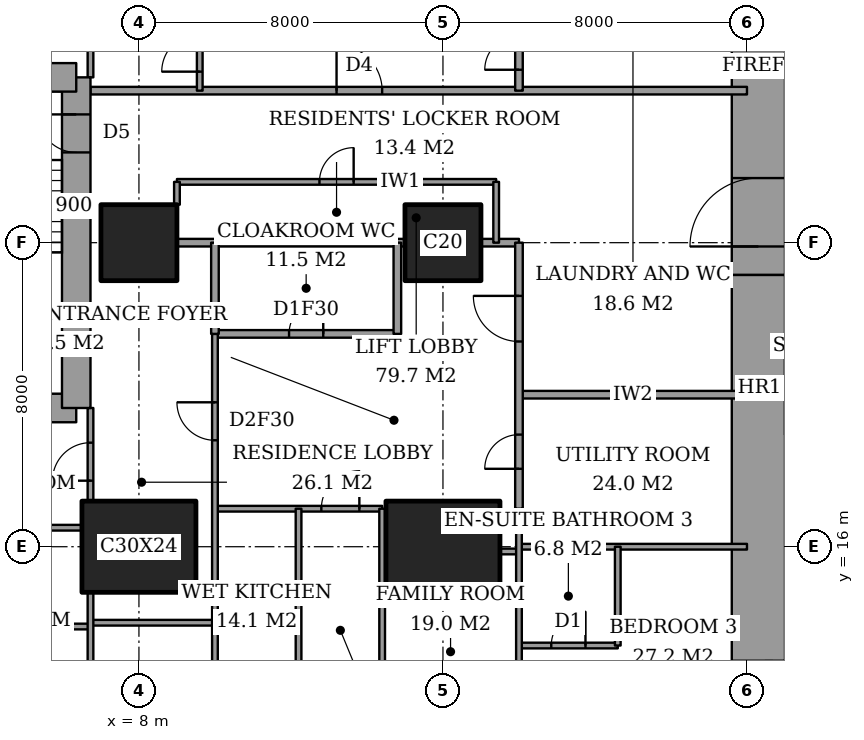
"""IFC4 building model, lengths in metres.
Left out: names, types, materials, properties, quantities, classifications, styles, units other than length and angle.
Written with IfcOpenShell. Run it as: python <this file> out.ifc"""

import sys

from ifc_helpers import new_model, si_unit, direction, frame, frame_2d, origin, origin_2d, place, context, subcontext, project, spatial, rectangle, extrude, element, fill, save


model = new_model("IFC4")
c1 = context("Model", 3, precision=1e-05, world=origin(), true_north=direction((0.0, 1.0)))
c2 = subcontext(c1, "Body", "Model", "MODEL_VIEW")
j1 = project(units=[si_unit("LENGTHUNIT", "METRE"), si_unit("PLANEANGLEUNIT", "RADIAN")], contexts=[c1])
p1 = place(None, origin())
s1 = spatial("IfcSite", under=j1, at=p1, CompositionType="ELEMENT")
p2 = place(p1, origin())
s2 = spatial("IfcBuilding", under=s1, at=p2, CompositionType="ELEMENT")
p3 = place(p2, frame((0.0, 0.0, 44.0)))
s3 = spatial("IfcBuildingStorey", under=s2, at=p3, CompositionType="ELEMENT", Elevation=44.0)
p4 = place(p3, frame((8.0, 16.0, 0.0), z_axis=(0.0, 0.0, 1.0), x_axis=(1.0, 0.0, 0.0)))
e1 = element("IfcColumn", 1, at=p4, inside=s3, PredefinedType="COLUMN", context=c2, shape_type="SweptSolid", body=[
    extrude(rectangle(XDim=3.0, YDim=2.4, at=origin_2d()), origin(), (0.0, 0.0, 1.0), 3.6),
])
p5 = place(p3, frame((8.0, 24.0, 0.0), z_axis=(0.0, 0.0, 1.0), x_axis=(1.0, 0.0, 0.0)))
e2 = element("IfcColumn", 2, at=p5, inside=s3, PredefinedType="COLUMN", context=c2, shape_type="SweptSolid", body=[
    extrude(rectangle(XDim=2.0, YDim=2.0, at=origin_2d()), origin(), (0.0, 0.0, 1.0), 3.6),
])
p6 = place(p3, frame((16.0, 16.0, 0.0), z_axis=(0.0, 0.0, 1.0), x_axis=(1.0, 0.0, 0.0)))
e3 = element("IfcColumn", 3, at=p6, inside=s3, PredefinedType="COLUMN", context=c2, shape_type="SweptSolid", body=[
    extrude(rectangle(XDim=3.0, YDim=2.4, at=origin_2d()), origin(), (0.0, 0.0, 1.0), 3.6),
])
p7 = place(p3, frame((16.0, 24.0, 0.0), z_axis=(0.0, 0.0, 1.0), x_axis=(1.0, 0.0, 0.0)))
e4 = element("IfcColumn", 4, at=p7, inside=s3, PredefinedType="COLUMN", context=c2, shape_type="SweptSolid", body=[
    extrude(rectangle(XDim=2.0, YDim=2.0, at=origin_2d()), origin(), (0.0, 0.0, 1.0), 3.6),
])
p8 = place(p3, frame((24.3, 13.0, 0.0), z_axis=(0.0, 0.0, 1.0), x_axis=(0.0, 1.0, 0.0)))
e5 = element("IfcWall", 5, at=p8, inside=s3, PredefinedType="SHEAR", context=c2, shape_type="SweptSolid", body=[
    extrude(rectangle(XDim=10.15, YDim=1.4, at=frame_2d((5.075, 0.0))), origin(), (0.0, 0.0, 1.0), 3.6),
])
p9 = place(p3, frame((24.3, 23.15, 0.0), z_axis=(0.0, 0.0, 1.0), x_axis=(0.0, 1.0, 0.0)))
e6 = element("IfcWall", 6, at=p9, inside=s3, PredefinedType="SHEAR", context=c2, shape_type="SweptSolid", body=[
    extrude(rectangle(XDim=11.85, YDim=1.4, at=frame_2d((5.925, 0.0))), origin(), (0.0, 0.0, 1.0), 3.6),
])
p10 = place(p9, frame((0.75, 0.0, 0.0)))
e7 = element("IfcOpeningElement", 7, at=p10, cuts=e6, PredefinedType="OPENING", context=c2, shape_type="SweptSolid", body=[
    extrude(rectangle(XDim=1.8, YDim=2.4, at=frame_2d((0.9, 1.2))), frame((0.0, 0.71, 0.0), z_axis=(0.0, -1.0, 0.0), x_axis=(1.0, 0.0, 0.0)), (0.0, 0.0, 1.0), 1.42),
])
p11 = place(p3, frame((1.9, 19.65, 0.0), z_axis=(0.0, 0.0, 1.0), x_axis=(1.0, 0.0, 0.0)))
e8 = element("IfcWall", 8, at=p11, inside=s3, PredefinedType="SHEAR", context=c2, shape_type="SweptSolid", body=[
    extrude(rectangle(XDim=4.45, YDim=0.75, at=frame_2d((2.225, 0.0))), origin(), (0.0, 0.0, 1.0), 3.6),
])
p12 = place(p3, frame((6.35, 19.65, 0.0), z_axis=(0.0, 0.0, 1.0), x_axis=(0.0, 1.0, 0.0)))
e9 = element("IfcWall", 9, at=p12, inside=s3, PredefinedType="SHEAR", context=c2, shape_type="SweptSolid", body=[
    extrude(rectangle(XDim=8.7, YDim=0.75, at=frame_2d((4.35, 0.0))), origin(), (0.0, 0.0, 1.0), 3.6),
])
p13 = place(p12, frame((6.725, 0.0, 0.0)))
e10 = element("IfcOpeningElement", 10, at=p13, cuts=e9, PredefinedType="OPENING", context=c2, shape_type="SweptSolid", body=[
    extrude(rectangle(XDim=1.0, YDim=2.1, at=frame_2d((0.5, 1.05))), frame((0.0, 0.385, 0.0), z_axis=(0.0, -1.0, 0.0), x_axis=(1.0, 0.0, 0.0)), (0.0, 0.0, 1.0), 0.77),
])
p14 = place(p3, frame((6.35, 28.35, 0.0), z_axis=(0.0, 0.0, 1.0), x_axis=(-1.0, 0.0, 0.0)))
e11 = element("IfcWall", 11, at=p14, inside=s3, PredefinedType="SHEAR", context=c2, shape_type="SweptSolid", body=[
    extrude(rectangle(XDim=4.45, YDim=0.75, at=frame_2d((2.225, 0.0))), origin(), (0.0, 0.0, 1.0), 3.6),
])
p15 = place(p3, frame((18.0, 13.4, 0.0), z_axis=(0.0, 0.0, 1.0), x_axis=(1.0, 0.0, 0.0)))
e12 = element("IfcWall", 12, at=p15, inside=s3, PredefinedType="PARTITIONING", context=c2, shape_type="SweptSolid", body=[
    extrude(rectangle(XDim=2.6, YDim=0.15, at=frame_2d((1.3, 0.0))), origin(), (0.0, 0.0, 1.0), 3.35),
])
p16 = place(p15, frame((0.85, 0.0, 0.0)))
e13 = element("IfcOpeningElement", 13, at=p16, cuts=e12, PredefinedType="OPENING", context=c2, shape_type="SweptSolid", body=[
    extrude(rectangle(XDim=0.9, YDim=2.1, at=frame_2d((0.45, 1.05))), frame((0.0, 0.085, 0.0), z_axis=(0.0, -1.0, 0.0), x_axis=(1.0, 0.0, 0.0)), (0.0, 0.0, 1.0), 0.17),
])
p17 = place(p3, frame((4.325, 13.9, 0.0), z_axis=(0.0, 0.0, 1.0), x_axis=(1.0, 0.0, 0.0)))
e14 = element("IfcWall", 14, at=p17, inside=s3, PredefinedType="PARTITIONING", context=c2, shape_type="SweptSolid", body=[
    extrude(rectangle(XDim=2.4, YDim=0.15, at=frame_2d((1.2, 0.0))), origin(), (0.0, 0.0, 1.0), 3.35),
])
p18 = place(p3, frame((6.725, 14.0, 0.0), z_axis=(0.0, 0.0, 1.0), x_axis=(1.0, 0.0, 0.0)))
e15 = element("IfcWall", 15, at=p18, inside=s3, PredefinedType="PARTITIONING", context=c2, shape_type="SweptSolid", body=[
    extrude(rectangle(XDim=3.275, YDim=0.15, at=frame_2d((1.637, 0.0))), origin(), (0.0, 0.0, 1.0), 3.35),
])
p19 = place(p3, frame((17.5, 15.875, 0.0), z_axis=(0.0, 0.0, 1.0), x_axis=(1.0, 0.0, 0.0)))
e16 = element("IfcWall", 16, at=p19, inside=s3, PredefinedType="PARTITIONING", context=c2, shape_type="SweptSolid", body=[
    extrude(rectangle(XDim=0.5, YDim=0.15, at=frame_2d((0.25, 0.0))), origin(), (0.0, 0.0, 1.0), 2.634),
])
p20 = place(p3, frame((18.0, 16.0, 0.0), z_axis=(0.0, 0.0, 1.0), x_axis=(1.0, 0.0, 0.0)))
e17 = element("IfcWall", 17, at=p20, inside=s3, PredefinedType="PARTITIONING", context=c2, shape_type="SweptSolid", body=[
    extrude(rectangle(XDim=6.0, YDim=0.15, at=frame_2d((3.0, 0.0))), origin(), (0.0, 0.0, 1.0), 2.634),
])
p21 = place(p3, frame((1.35, 16.5, 0.0), z_axis=(0.0, 0.0, 1.0), x_axis=(1.0, 0.0, 0.0)))
e18 = element("IfcWall", 18, at=p21, inside=s3, PredefinedType="PARTITIONING", context=c2, shape_type="SweptSolid", body=[
    extrude(rectangle(XDim=5.15, YDim=0.15, at=frame_2d((2.575, 0.0))), origin(), (0.0, 0.0, 1.0), 3.35),
])
p22 = place(p3, frame((10.0, 17.0, 0.0), z_axis=(0.0, 0.0, 1.0), x_axis=(1.0, 0.0, 0.0)))
e19 = element("IfcWall", 19, at=p22, inside=s3, PredefinedType="PARTITIONING", context=c2, shape_type="SweptSolid", body=[
    extrude(rectangle(XDim=4.4, YDim=0.15, at=frame_2d((2.2, 0.0))), origin(), (0.0, 0.0, 1.0), 3.35),
])
p23 = place(p22, frame((2.8, 0.0, 0.0)))
e20 = element("IfcOpeningElement", 20, at=p23, cuts=e19, PredefinedType="OPENING", context=c2, shape_type="SweptSolid", body=[
    extrude(rectangle(XDim=1.0, YDim=2.1, at=frame_2d((0.5, 1.05))), frame((0.0, 0.085, 0.0), z_axis=(0.0, -1.0, 0.0), x_axis=(1.0, 0.0, 0.0)), (0.0, 0.0, 1.0), 0.17),
])
p24 = place(p3, frame((18.0, 20.0, 0.0), z_axis=(0.0, 0.0, 1.0), x_axis=(1.0, 0.0, 0.0)))
e21 = element("IfcWall", 21, at=p24, inside=s3, PredefinedType="PARTITIONING", context=c2, shape_type="SweptSolid", body=[
    extrude(rectangle(XDim=6.0, YDim=0.2, at=frame_2d((3.0, 0.0))), origin(), (0.0, 0.0, 1.0), 3.35),
])
p25 = place(p3, frame((10.0, 21.6, 0.0), z_axis=(0.0, 0.0, 1.0), x_axis=(1.0, 0.0, 0.0)))
e22 = element("IfcWall", 22, at=p25, inside=s3, PredefinedType="PARTITIONING", context=c2, shape_type="SweptSolid", body=[
    extrude(rectangle(XDim=4.8, YDim=0.2, at=frame_2d((2.4, 0.0))), origin(), (0.0, 0.0, 1.0), 3.35),
])
p26 = place(p25, frame((1.95, 0.0, 0.0)))
e23 = element("IfcOpeningElement", 23, at=p26, cuts=e22, PredefinedType="OPENING", context=c2, shape_type="SweptSolid", body=[
    extrude(rectangle(XDim=0.9, YDim=2.1, at=frame_2d((0.45, 1.05))), frame((0.0, 0.11, 0.0), z_axis=(0.0, -1.0, 0.0), x_axis=(1.0, 0.0, 0.0)), (0.0, 0.0, 1.0), 0.22),
])
p27 = place(p3, frame((9.0, 24.0, 0.0), z_axis=(0.0, 0.0, 1.0), x_axis=(1.0, 0.0, 0.0)))
e24 = element("IfcWall", 24, at=p27, inside=s3, PredefinedType="PARTITIONING", context=c2, shape_type="SweptSolid", body=[
    extrude(rectangle(XDim=6.0, YDim=0.2, at=frame_2d((3.0, 0.0))), origin(), (0.0, 0.0, 1.0), 3.35),
])
p28 = place(p3, frame((17.0, 24.0, 0.0), z_axis=(0.0, 0.0, 1.0), x_axis=(1.0, 0.0, 0.0)))
e25 = element("IfcWall", 25, at=p28, inside=s3, PredefinedType="PARTITIONING", context=c2, shape_type="SweptSolid", body=[
    extrude(rectangle(XDim=1.0, YDim=0.2, at=frame_2d((0.5, 0.0))), origin(), (0.0, 0.0, 1.0), 3.35),
])
p29 = place(p3, frame((9.0, 25.6, 0.0), z_axis=(0.0, 0.0, 1.0), x_axis=(1.0, 0.0, 0.0)))
e26 = element("IfcWall", 26, at=p29, inside=s3, PredefinedType="PARTITIONING", context=c2, shape_type="SweptSolid", body=[
    extrude(rectangle(XDim=8.4, YDim=0.15, at=frame_2d((4.2, 0.0))), origin(), (0.0, 0.0, 1.0), 3.35),
])
p30 = place(p29, frame((3.75, 0.0, 0.0)))
e27 = element("IfcOpeningElement", 27, at=p30, cuts=e26, PredefinedType="OPENING", context=c2, shape_type="SweptSolid", body=[
    extrude(rectangle(XDim=0.9, YDim=2.1, at=frame_2d((0.45, 1.05))), frame((0.0, 0.085, 0.0), z_axis=(0.0, -1.0, 0.0), x_axis=(1.0, 0.0, 0.0)), (0.0, 0.0, 1.0), 0.17),
])
p31 = place(p3, frame((6.725, 28.0, 0.0), z_axis=(0.0, 0.0, 1.0), x_axis=(1.0, 0.0, 0.0)))
e28 = element("IfcWall", 28, at=p31, inside=s3, PredefinedType="PARTITIONING", context=c2, shape_type="SweptSolid", body=[
    extrude(rectangle(XDim=17.275, YDim=0.2, at=frame_2d((8.637, 0.0))), origin(), (0.0, 0.0, 1.0), 3.35),
])
p32 = place(p31, frame((6.475, 0.0, 0.0)))
e29 = element("IfcOpeningElement", 29, at=p32, cuts=e28, PredefinedType="OPENING", context=c2, shape_type="SweptSolid", body=[
    extrude(rectangle(XDim=1.2, YDim=2.4, at=frame_2d((0.6, 1.2))), frame((0.0, 0.11, 0.0), z_axis=(0.0, -1.0, 0.0), x_axis=(1.0, 0.0, 0.0)), (0.0, 0.0, 1.0), 0.22),
])
p33 = place(p3, frame((6.725, 10.6, 0.0), z_axis=(0.0, 0.0, 1.0), x_axis=(0.0, 1.0, 0.0)))
e30 = element("IfcWall", 30, at=p33, inside=s3, PredefinedType="PARTITIONING", context=c2, shape_type="SweptSolid", body=[
    extrude(rectangle(XDim=4.2, YDim=0.15, at=frame_2d((2.1, 0.0))), origin(), (0.0, 0.0, 1.0), 3.35),
])
p34 = place(p33, frame((1.2, 0.0, 0.0)))
e31 = element("IfcOpeningElement", 31, at=p34, cuts=e30, PredefinedType="OPENING", context=c2, shape_type="SweptSolid", body=[
    extrude(rectangle(XDim=0.9, YDim=2.1, at=frame_2d((0.45, 1.05))), frame((0.0, 0.085, 0.0), z_axis=(0.0, -1.0, 0.0), x_axis=(1.0, 0.0, 0.0)), (0.0, 0.0, 1.0), 0.17),
])
p35 = place(p3, frame((6.725, 17.2, 0.0), z_axis=(0.0, 0.0, 1.0), x_axis=(0.0, 1.0, 0.0)))
e32 = element("IfcWall", 32, at=p35, inside=s3, PredefinedType="PARTITIONING", context=c2, shape_type="SweptSolid", body=[
    extrude(rectangle(XDim=2.45, YDim=0.15, at=frame_2d((1.225, 0.0))), origin(), (0.0, 0.0, 1.0), 3.35),
])
p36 = place(p35, frame((0.538, 0.0, 0.0)))
e33 = element("IfcOpeningElement", 33, at=p36, cuts=e32, PredefinedType="OPENING", context=c2, shape_type="SweptSolid", body=[
    extrude(rectangle(XDim=1.0, YDim=2.1, at=frame_2d((0.5, 1.05))), frame((0.0, 0.085, 0.0), z_axis=(0.0, -1.0, 0.0), x_axis=(1.0, 0.0, 0.0)), (0.0, 0.0, 1.0), 0.17),
])
p37 = place(p3, frame((6.725, 28.35, 0.0), z_axis=(0.0, 0.0, 1.0), x_axis=(0.0, 1.0, 0.0)))
e34 = element("IfcWall", 34, at=p37, inside=s3, PredefinedType="PARTITIONING", context=c2, shape_type="SweptSolid", body=[
    extrude(rectangle(XDim=2.45, YDim=0.15, at=frame_2d((1.225, 0.0))), origin(), (0.0, 0.0, 1.0), 3.35),
])
p38 = place(p37, frame((0.913, 0.0, 0.0)))
e35 = element("IfcOpeningElement", 35, at=p38, cuts=e34, PredefinedType="OPENING", context=c2, shape_type="SweptSolid", body=[
    extrude(rectangle(XDim=1.0, YDim=2.1, at=frame_2d((0.5, 1.05))), frame((0.0, 0.085, 0.0), z_axis=(0.0, -1.0, 0.0), x_axis=(1.0, 0.0, 0.0)), (0.0, 0.0, 1.0), 0.17),
])
p39 = place(p3, frame((9.0, 25.0, 0.0), z_axis=(0.0, 0.0, 1.0), x_axis=(0.0, 1.0, 0.0)))
e36 = element("IfcWall", 36, at=p39, inside=s3, PredefinedType="PARTITIONING", context=c2, shape_type="SweptSolid", body=[
    extrude(rectangle(XDim=0.6, YDim=0.15, at=frame_2d((0.3, 0.0))), origin(), (0.0, 0.0, 1.0), 3.35),
])
p40 = place(p3, frame((9.6, 28.0, 0.0), z_axis=(0.0, 0.0, 1.0), x_axis=(0.0, 1.0, 0.0)))
e37 = element("IfcWall", 37, at=p40, inside=s3, PredefinedType="PARTITIONING", context=c2, shape_type="SweptSolid", body=[
    extrude(rectangle(XDim=9.4, YDim=0.15, at=frame_2d((4.7, 0.0))), origin(), (0.0, 0.0, 1.0), 3.35),
])
p41 = place(p40, frame((0.5, 0.0, 0.0)))
e38 = element("IfcOpeningElement", 38, at=p41, cuts=e37, PredefinedType="OPENING", context=c2, shape_type="SweptSolid", body=[
    extrude(rectangle(XDim=1.0, YDim=2.1, at=frame_2d((0.5, 1.05))), frame((0.0, 0.085, 0.0), z_axis=(0.0, -1.0, 0.0), x_axis=(1.0, 0.0, 0.0)), (0.0, 0.0, 1.0), 0.17),
])
p42 = place(p3, frame((10.0, 21.6, 0.0), z_axis=(0.0, 0.0, 1.0), x_axis=(0.0, 1.0, 0.0)))
e39 = element("IfcWall", 39, at=p42, inside=s3, PredefinedType="PARTITIONING", context=c2, shape_type="SweptSolid", body=[
    extrude(rectangle(XDim=2.4, YDim=0.2, at=frame_2d((1.2, 0.0))), origin(), (0.0, 0.0, 1.0), 3.35),
])
p43 = place(p3, frame((10.0, 10.6, 0.0), z_axis=(0.0, 0.0, 1.0), x_axis=(0.0, 1.0, 0.0)))
e40 = element("IfcWall", 40, at=p43, inside=s3, PredefinedType="PARTITIONING", context=c2, shape_type="SweptSolid", body=[
    extrude(rectangle(XDim=11.0, YDim=0.15, at=frame_2d((5.5, 0.0))), origin(), (0.0, 0.0, 1.0), 3.35),
])
p44 = place(p43, frame((8.2, 0.0, 0.0)))
e41 = element("IfcOpeningElement", 41, at=p44, cuts=e40, PredefinedType="OPENING", context=c2, shape_type="SweptSolid", body=[
    extrude(rectangle(XDim=1.0, YDim=2.1, at=frame_2d((0.5, 1.05))), frame((0.0, 0.085, 0.0), z_axis=(0.0, -1.0, 0.0), x_axis=(1.0, 0.0, 0.0)), (0.0, 0.0, 1.0), 0.17),
])
for number, where, z_axis, x_axis in (
    (42, (12.2, 10.6, 0.0), (0.0, 0.0, 1.0), (0.0, 1.0, 0.0)),
    (43, (14.4, 10.6, 0.0), (0.0, 0.0, 1.0), (0.0, 1.0, 0.0)),
):
    element("IfcWall", number, at=place(p3, frame(where, z_axis=z_axis, x_axis=x_axis)), inside=s3, PredefinedType="PARTITIONING", context=c2, shape_type="SweptSolid", body=[
        extrude(rectangle(XDim=6.4, YDim=0.15, at=frame_2d((3.2, 0.0))), origin(), (0.0, 0.0, 1.0), 3.35),
    ])
p45 = place(p3, frame((14.8, 21.6, 0.0), z_axis=(0.0, 0.0, 1.0), x_axis=(0.0, 1.0, 0.0)))
e44 = element("IfcWall", 44, at=p45, inside=s3, PredefinedType="PARTITIONING", context=c2, shape_type="SweptSolid", body=[
    extrude(rectangle(XDim=2.4, YDim=0.2, at=frame_2d((1.2, 0.0))), origin(), (0.0, 0.0, 1.0), 3.35),
])
p46 = place(p3, frame((17.4, 24.0, 0.0), z_axis=(0.0, 0.0, 1.0), x_axis=(0.0, 1.0, 0.0)))
e45 = element("IfcWall", 45, at=p46, inside=s3, PredefinedType="PARTITIONING", context=c2, shape_type="SweptSolid", body=[
    extrude(rectangle(XDim=1.6, YDim=0.15, at=frame_2d((0.8, 0.0))), origin(), (0.0, 0.0, 1.0), 3.35),
])
p47 = place(p3, frame((18.0, 17.0, 0.0), z_axis=(0.0, 0.0, 1.0), x_axis=(0.0, 1.0, 0.0)))
e46 = element("IfcWall", 46, at=p47, inside=s3, PredefinedType="PARTITIONING", context=c2, shape_type="SweptSolid", body=[
    extrude(rectangle(XDim=7.0, YDim=0.2, at=frame_2d((3.5, 0.0))), origin(), (0.0, 0.0, 1.0), 3.35),
])
p48 = place(p47, frame((4.4, 0.0, 0.0)))
e47 = element("IfcOpeningElement", 47, at=p48, cuts=e46, PredefinedType="OPENING", context=c2, shape_type="SweptSolid", body=[
    extrude(rectangle(XDim=1.2, YDim=2.4, at=frame_2d((0.6, 1.2))), frame((0.0, 0.11, 0.0), z_axis=(0.0, -1.0, 0.0), x_axis=(1.0, 0.0, 0.0)), (0.0, 0.0, 1.0), 0.22),
])
p49 = place(p47, frame((1.05, 0.0, 0.0)))
e48 = element("IfcOpeningElement", 48, at=p49, cuts=e46, PredefinedType="OPENING", context=c2, shape_type="SweptSolid", body=[
    extrude(rectangle(XDim=0.9, YDim=2.1, at=frame_2d((0.45, 1.05))), frame((0.0, 0.11, 0.0), z_axis=(0.0, -1.0, 0.0), x_axis=(1.0, 0.0, 0.0)), (0.0, 0.0, 1.0), 0.22),
])
p50 = place(p3, frame((18.0, 28.0, 0.0), z_axis=(0.0, 0.0, 1.0), x_axis=(0.0, 1.0, 0.0)))
e49 = element("IfcWall", 49, at=p50, inside=s3, PredefinedType="PARTITIONING", context=c2, shape_type="SweptSolid", body=[
    extrude(rectangle(XDim=3.1, YDim=0.2, at=frame_2d((1.55, 0.0))), origin(), (0.0, 0.0, 1.0), 3.35),
])
p51 = place(p50, frame((0.55, 0.0, 0.0)))
e50 = element("IfcOpeningElement", 50, at=p51, cuts=e49, PredefinedType="OPENING", context=c2, shape_type="SweptSolid", body=[
    extrude(rectangle(XDim=0.9, YDim=2.1, at=frame_2d((0.45, 1.05))), frame((0.0, 0.11, 0.0), z_axis=(0.0, -1.0, 0.0), x_axis=(1.0, 0.0, 0.0)), (0.0, 0.0, 1.0), 0.22),
])
p52 = place(p3, frame((18.0, 10.6, 0.0), z_axis=(0.0, 0.0, 1.0), x_axis=(0.0, 1.0, 0.0)))
e51 = element("IfcWall", 51, at=p52, inside=s3, PredefinedType="PARTITIONING", context=c2, shape_type="SweptSolid", body=[
    extrude(rectangle(XDim=6.4, YDim=0.15, at=frame_2d((3.2, 0.0))), origin(), (0.0, 0.0, 1.0), 3.35),
])
p53 = place(p3, frame((20.6, 13.4, 0.0), z_axis=(0.0, 0.0, 1.0), x_axis=(0.0, 1.0, 0.0)))
e52 = element("IfcWall", 52, at=p53, inside=s3, PredefinedType="PARTITIONING", context=c2, shape_type="SweptSolid", body=[
    extrude(rectangle(XDim=2.6, YDim=0.15, at=frame_2d((1.3, 0.0))), origin(), (0.0, 0.0, 1.0), 3.35),
])
p54 = place(p36, origin())
e53 = element("IfcDoor", 53, at=p54, inside=s3, OperationType="SINGLE_SWING_RIGHT", PredefinedType="DOOR", context=c2, shape_type="SweptSolid", body=[
    extrude(rectangle(XDim=1.0, YDim=2.1, at=frame_2d((0.5, 1.05))), frame((0.0, 0.025, 0.0), z_axis=(0.0, -1.0, 0.0), x_axis=(1.0, 0.0, 0.0)), (0.0, 0.0, 1.0), 0.05),
])
fill(e33, e53)
p55 = place(p44, origin())
e54 = element("IfcDoor", 54, at=p55, inside=s3, OperationType="SINGLE_SWING_LEFT", PredefinedType="DOOR", context=c2, shape_type="SweptSolid", body=[
    extrude(rectangle(XDim=1.0, YDim=2.1, at=frame_2d((0.5, 1.05))), frame((0.0, 0.025, 0.0), z_axis=(0.0, -1.0, 0.0), x_axis=(1.0, 0.0, 0.0)), (0.0, 0.0, 1.0), 0.05),
])
fill(e41, e54)
p56 = place(p26, origin())
e55 = element("IfcDoor", 55, at=p56, inside=s3, OperationType="SINGLE_SWING_LEFT", PredefinedType="DOOR", context=c2, shape_type="SweptSolid", body=[
    extrude(rectangle(XDim=0.9, YDim=2.1, at=frame_2d((0.45, 1.05))), frame((0.0, 0.025, 0.0), z_axis=(0.0, -1.0, 0.0), x_axis=(1.0, 0.0, 0.0)), (0.0, 0.0, 1.0), 0.05),
])
fill(e23, e55)
p57 = place(p48, origin())
e56 = element("IfcDoor", 56, at=p57, inside=s3, OperationType="SINGLE_SWING_LEFT", PredefinedType="DOOR", context=c2, shape_type="SweptSolid", body=[
    extrude(rectangle(XDim=1.2, YDim=2.4, at=frame_2d((0.6, 1.2))), frame((0.0, 0.025, 0.0), z_axis=(0.0, -1.0, 0.0), x_axis=(1.0, 0.0, 0.0)), (0.0, 0.0, 1.0), 0.05),
])
fill(e47, e56)
p58 = place(p23, origin())
e57 = element("IfcDoor", 57, at=p58, inside=s3, OperationType="SINGLE_SWING_LEFT", PredefinedType="DOOR", context=c2, shape_type="SweptSolid", body=[
    extrude(rectangle(XDim=1.0, YDim=2.1, at=frame_2d((0.5, 1.05))), frame((0.0, 0.025, 0.0), z_axis=(0.0, -1.0, 0.0), x_axis=(1.0, 0.0, 0.0)), (0.0, 0.0, 1.0), 0.05),
])
fill(e20, e57)
p59 = place(p16, origin())
e58 = element("IfcDoor", 58, at=p59, inside=s3, OperationType="SINGLE_SWING_LEFT", PredefinedType="DOOR", context=c2, shape_type="SweptSolid", body=[
    extrude(rectangle(XDim=0.9, YDim=2.1, at=frame_2d((0.45, 1.05))), frame((0.0, 0.025, 0.0), z_axis=(0.0, -1.0, 0.0), x_axis=(1.0, 0.0, 0.0)), (0.0, 0.0, 1.0), 0.05),
])
fill(e13, e58)
p60 = place(p49, origin())
e59 = element("IfcDoor", 59, at=p60, inside=s3, OperationType="SINGLE_SWING_RIGHT", PredefinedType="DOOR", context=c2, shape_type="SweptSolid", body=[
    extrude(rectangle(XDim=0.9, YDim=2.1, at=frame_2d((0.45, 1.05))), frame((0.0, 0.025, 0.0), z_axis=(0.0, -1.0, 0.0), x_axis=(1.0, 0.0, 0.0)), (0.0, 0.0, 1.0), 0.05),
])
fill(e48, e59)
p61 = place(p41, origin())
e60 = element("IfcDoor", 60, at=p61, inside=s3, OperationType="SINGLE_SWING_RIGHT", PredefinedType="DOOR", context=c2, shape_type="SweptSolid", body=[
    extrude(rectangle(XDim=1.0, YDim=2.1, at=frame_2d((0.5, 1.05))), frame((0.0, 0.025, 0.0), z_axis=(0.0, -1.0, 0.0), x_axis=(1.0, 0.0, 0.0)), (0.0, 0.0, 1.0), 0.05),
])
fill(e38, e60)
p62 = place(p32, origin())
e61 = element("IfcDoor", 61, at=p62, inside=s3, OperationType="SINGLE_SWING_RIGHT", PredefinedType="DOOR", context=c2, shape_type="SweptSolid", body=[
    extrude(rectangle(XDim=1.2, YDim=2.4, at=frame_2d((0.6, 1.2))), frame((0.0, 0.025, 0.0), z_axis=(0.0, -1.0, 0.0), x_axis=(1.0, 0.0, 0.0)), (0.0, 0.0, 1.0), 0.05),
])
fill(e29, e61)
p63 = place(p51, origin())
e62 = element("IfcDoor", 62, at=p63, inside=s3, OperationType="SINGLE_SWING_RIGHT", PredefinedType="DOOR", context=c2, shape_type="SweptSolid", body=[
    extrude(rectangle(XDim=0.9, YDim=2.1, at=frame_2d((0.45, 1.05))), frame((0.0, 0.025, 0.0), z_axis=(0.0, -1.0, 0.0), x_axis=(1.0, 0.0, 0.0)), (0.0, 0.0, 1.0), 0.05),
])
fill(e50, e62)
p64 = place(p30, origin())
e63 = element("IfcDoor", 63, at=p64, inside=s3, OperationType="SINGLE_SWING_LEFT", PredefinedType="DOOR", context=c2, shape_type="SweptSolid", body=[
    extrude(rectangle(XDim=0.9, YDim=2.1, at=frame_2d((0.45, 1.05))), frame((0.0, 0.025, 0.0), z_axis=(0.0, -1.0, 0.0), x_axis=(1.0, 0.0, 0.0)), (0.0, 0.0, 1.0), 0.05),
])
fill(e27, e63)
p65 = place(p10, origin())
e64 = element("IfcDoor", 64, at=p65, inside=s3, OperationType="DOUBLE_DOOR_DOUBLE_SWING", PredefinedType="DOOR", context=c2, shape_type="SweptSolid", body=[
    extrude(rectangle(XDim=1.8, YDim=2.4, at=frame_2d((0.9, 1.2))), frame((0.0, 0.025, 0.0), z_axis=(0.0, -1.0, 0.0), x_axis=(1.0, 0.0, 0.0)), (0.0, 0.0, 1.0), 0.05),
])
fill(e7, e64)
p66 = place(p13, origin())
e65 = element("IfcDoor", 65, at=p66, inside=s3, OperationType="SINGLE_SWING_LEFT", PredefinedType="DOOR", context=c2, shape_type="SweptSolid", body=[
    extrude(rectangle(XDim=1.0, YDim=2.1, at=frame_2d((0.5, 1.05))), frame((0.0, 0.025, 0.0), z_axis=(0.0, -1.0, 0.0), x_axis=(1.0, 0.0, 0.0)), (0.0, 0.0, 1.0), 0.05),
])
fill(e10, e65)
save(model, sys.argv[1])
